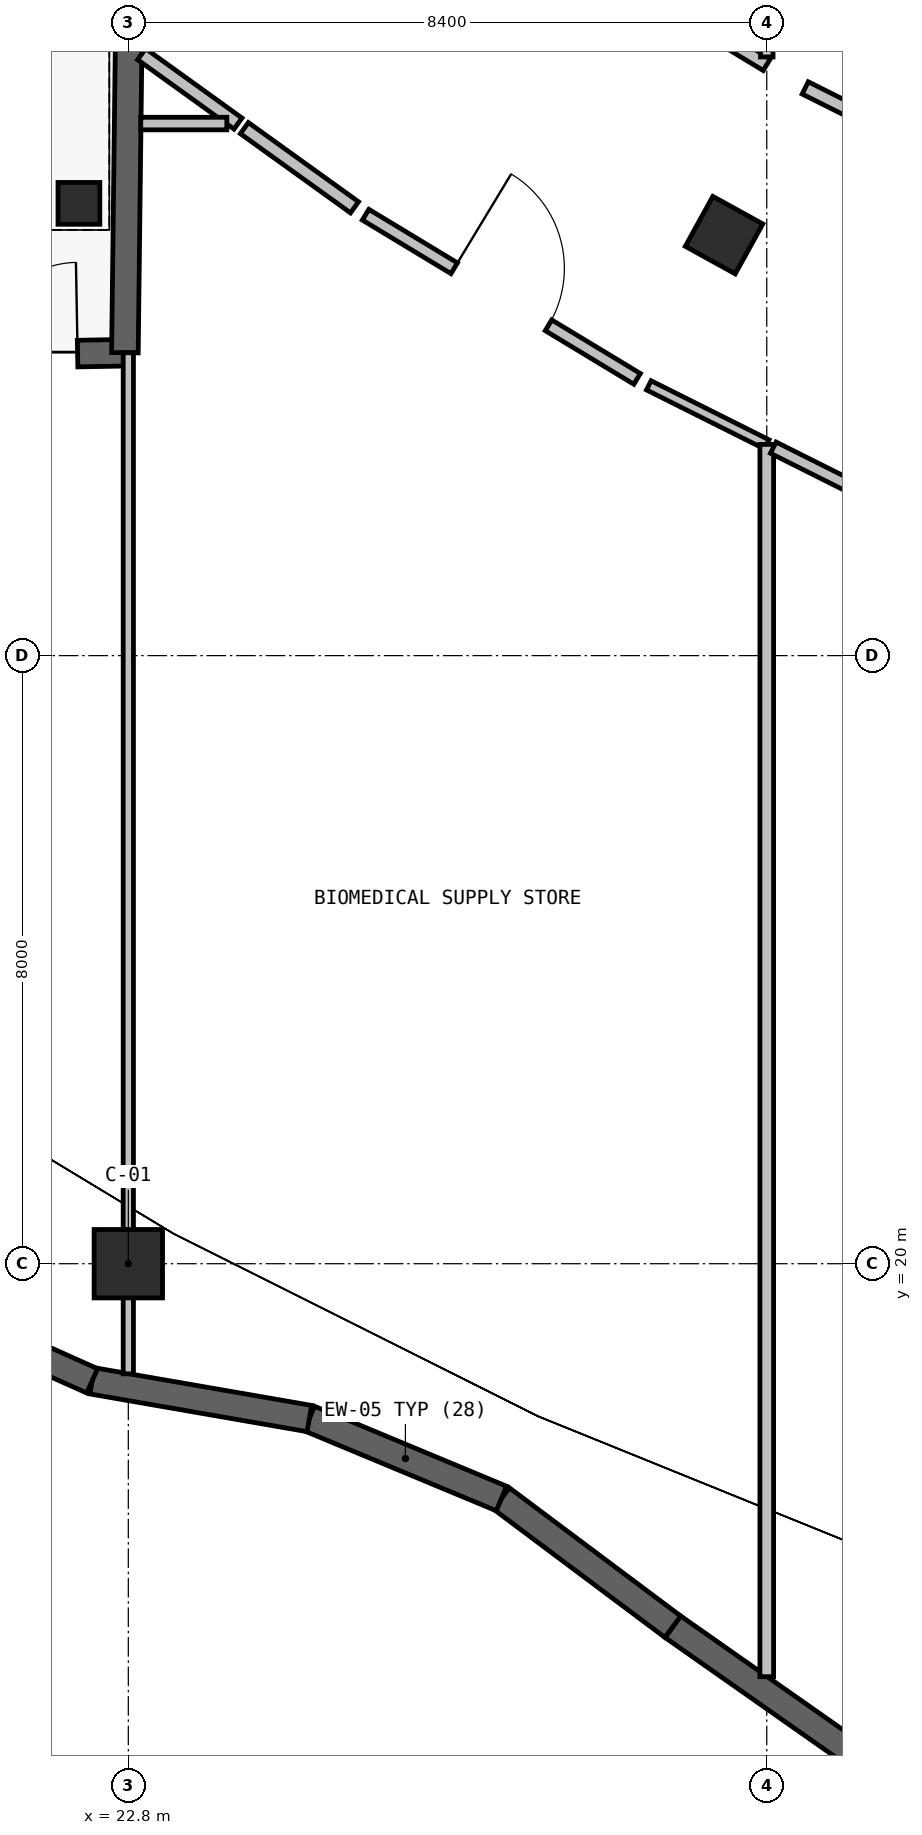
"""IFC4 building model, lengths in metres.
Left out: names, types, materials, properties, quantities, classifications, styles, units other than length and angle.
Written with IfcOpenShell. Run it as: python <this file> out.ifc"""

import sys

from ifc_helpers import new_model, si_unit, direction, frame, frame_2d, origin, origin_2d, place, context, subcontext, project, spatial, rectangle, extrude, element, fill, save


model = new_model("IFC4")
c1 = context("Model", 3, precision=1e-05, world=origin(), true_north=direction((0.0, 1.0)))
c2 = subcontext(c1, "Body", "Model", "MODEL_VIEW")
j1 = project(units=[si_unit("LENGTHUNIT", "METRE"), si_unit("PLANEANGLEUNIT", "RADIAN")], contexts=[c1])
p1 = place(None, origin())
s1 = spatial("IfcSite", under=j1, at=p1, CompositionType="ELEMENT")
p2 = place(p1, origin())
s2 = spatial("IfcBuilding", under=s1, at=p2, CompositionType="ELEMENT")
p3 = place(p2, frame((0.0, 0.0, -4.8)))
s3 = spatial("IfcBuildingStorey", under=s2, at=p3, CompositionType="ELEMENT", Elevation=-4.8)
p4 = place(p3, frame((22.15, 33.95, -0.245), z_axis=(0.0, 0.0, 1.0), x_axis=(1.0, 0.0, 0.0)))
e1 = element("IfcColumn", 1, at=p4, inside=s3, PredefinedType="COLUMN", context=c2, shape_type="SweptSolid", body=[
    extrude(rectangle(XDim=0.55, YDim=0.55, at=origin_2d()), origin(), (0.0, 0.0, 1.0), 3.625),
])
p5 = place(p3, frame((22.8, 20.0, 0.0), z_axis=(0.0, 0.0, 1.0), x_axis=(1.0, 0.0, 0.0)))
e2 = element("IfcColumn", 2, at=p5, inside=s3, PredefinedType="COLUMN", context=c2, shape_type="SweptSolid", body=[
    extrude(rectangle(XDim=0.9, YDim=0.9, at=origin_2d()), origin(), (0.0, 0.0, 1.0), 4.565),
])
p6 = place(p3, frame((30.638, 33.532, 0.0), z_axis=(0.0, 0.0, 1.0), x_axis=(0.483007324118, 0.875616311434, 0.0)))
e3 = element("IfcColumn", 3, at=p6, inside=s3, PredefinedType="COLUMN", context=c2, shape_type="SweptSolid", body=[
    extrude(rectangle(XDim=0.75, YDim=0.75, at=origin_2d()), origin(), (0.0, 0.0, 1.0), 4.8),
])
p7 = place(p3, frame((32.305, 13.582, 0.0), z_axis=(0.0, 0.0, 1.0), x_axis=(-0.818653879161, 0.574287233129, 0.0)))
e4 = element("IfcWall", 4, at=p7, inside=s3, PredefinedType="SHEAR", context=c2, shape_type="SweptSolid", body=[
    extrude(rectangle(XDim=2.859, YDim=0.35, at=frame_2d((1.43, 0.0))), origin(), (0.0, 0.0, 1.0), 4.45),
])
p8 = place(p3, frame((29.964, 15.224, 0.0), z_axis=(0.0, 0.0, 1.0), x_axis=(-0.800779557006, 0.598959181482, 0.0)))
e5 = element("IfcWall", 5, at=p8, inside=s3, PredefinedType="SHEAR", context=c2, shape_type="SweptSolid", body=[
    extrude(rectangle(XDim=2.816, YDim=0.35, at=frame_2d((1.408, 0.0))), origin(), (0.0, 0.0, 1.0), 4.45),
])
p9 = place(p3, frame((27.709, 16.911, 0.0), z_axis=(0.0, 0.0, 1.0), x_axis=(-0.923200896041, 0.384317714331, 0.0)))
e6 = element("IfcWall", 6, at=p9, inside=s3, PredefinedType="SHEAR", context=c2, shape_type="SweptSolid", body=[
    extrude(rectangle(XDim=2.737, YDim=0.35, at=frame_2d((1.369, 0.0))), origin(), (0.0, 0.0, 1.0), 4.45),
])
p10 = place(p3, frame((25.182, 17.963, 0.0), z_axis=(0.0, 0.0, 1.0), x_axis=(-0.985266066701, 0.171028587693, 0.0)))
e7 = element("IfcWall", 7, at=p10, inside=s3, PredefinedType="SHEAR", context=c2, shape_type="SweptSolid", body=[
    extrude(rectangle(XDim=2.901, YDim=0.35, at=frame_2d((1.45, 0.0))), origin(), (0.0, 0.0, 1.0), 4.45),
])
p11 = place(p3, frame((22.324, 18.459, 0.0), z_axis=(0.0, 0.0, 1.0), x_axis=(-0.912719610164, 0.408586481937, 0.0)))
e8 = element("IfcWall", 8, at=p11, inside=s3, PredefinedType="SHEAR", context=c2, shape_type="SweptSolid", body=[
    extrude(rectangle(XDim=2.793, YDim=0.35, at=frame_2d((1.396, 0.0))), origin(), (0.0, 0.0, 1.0), 4.45),
])
p12 = place(p3, frame((19.11, 31.919, 0.0), z_axis=(0.0, 0.0, 1.0), x_axis=(0.999835282464, 0.018149598871, 0.0)))
e9 = element("IfcWall", 9, at=p12, inside=s3, PredefinedType="SHEAR", context=c2, shape_type="SweptSolid", body=[
    extrude(rectangle(XDim=3.645, YDim=0.35, at=frame_2d((1.823, 0.0))), origin(), (0.0, 0.0, 1.0), 4.45),
])
p13 = place(p12, frame((0.623, 0.0, 0.0)))
e10 = element("IfcOpeningElement", 10, at=p13, cuts=e9, PredefinedType="OPENING", context=c2, shape_type="SweptSolid", body=[
    extrude(rectangle(XDim=2.4, YDim=2.35, at=frame_2d((1.2, 1.175))), frame((0.0, 0.185, 0.0), z_axis=(0.0, -1.0, 0.0), x_axis=(1.0, 0.0, 0.0)), (0.0, 0.0, 1.0), 0.37),
])
p14 = place(p3, frame((22.755, 31.985, 0.0), z_axis=(0.0, 0.0, 1.0), x_axis=(0.012149651428, 0.999926190261, 0.0)))
e11 = element("IfcWall", 11, at=p14, inside=s3, PredefinedType="SHEAR", context=c2, shape_type="SweptSolid", body=[
    extrude(rectangle(XDim=4.943, YDim=0.35, at=frame_2d((2.472, 0.0))), origin(), (0.0, 0.0, 1.0), 4.45),
])
p15 = place(p3, frame((31.2, 35.775, 0.0), z_axis=(0.0, 0.0, 1.0), x_axis=(-0.855653754928, 0.517548694982, 0.0)))
e12 = element("IfcWall", 12, at=p15, inside=s3, PredefinedType="PARTITIONING", context=c2, shape_type="SweptSolid", body=[
    extrude(rectangle(XDim=3.407, YDim=0.18, at=frame_2d((1.703, 0.0))), origin(), (0.0, 0.0, 1.0), 4.45),
])
p16 = place(p3, frame((22.975, 35.913, 0.0), z_axis=(0.0, 0.0, 1.0), x_axis=(0.811457274754, -0.584411748042, 0.0)))
e13 = element("IfcWall", 13, at=p16, inside=s3, PredefinedType="PARTITIONING", context=c2, shape_type="SweptSolid", body=[
    extrude(rectangle(XDim=1.562, YDim=0.18, at=frame_2d((0.781, 0.0))), origin(), (0.0, 0.0, 1.0), 4.45),
])
p17 = place(p3, frame((24.096, 35.0, 0.0), z_axis=(0.0, 0.0, 1.0), x_axis=(-1.0, 0.0, 0.0)))
e14 = element("IfcWall", 14, at=p17, inside=s3, PredefinedType="PARTITIONING", context=c2, shape_type="SweptSolid", body=[
    extrude(rectangle(XDim=1.132, YDim=0.165, at=frame_2d((0.566, 0.0))), origin(), (0.0, 0.0, 1.0), 4.45),
])
p18 = place(p3, frame((31.2, 43.854, 0.0), z_axis=(0.0, 0.0, 1.0), x_axis=(0.0, -1.0, 0.0)))
e15 = element("IfcWall", 15, at=p18, inside=s3, PredefinedType="PARTITIONING", context=c2, shape_type="SweptSolid", body=[
    extrude(rectangle(XDim=7.978, YDim=0.165, at=frame_2d((3.989, 0.0))), origin(), (0.0, 0.0, 1.0), 4.45),
])
p19 = place(p3, frame((22.8, 18.551, 0.0), z_axis=(0.0, 0.0, 1.0), x_axis=(0.0, 1.0, 0.0)))
e16 = element("IfcWall", 16, at=p19, inside=s3, PredefinedType="PARTITIONING", context=c2, shape_type="SweptSolid", body=[
    extrude(rectangle(XDim=13.433, YDim=0.135, at=frame_2d((6.716, 0.0))), origin(), (0.0, 0.0, 1.0), 4.45),
])
p20 = place(p3, frame((24.327, 34.94, 0.0), z_axis=(0.0, 0.0, 1.0), x_axis=(0.811871506141, -0.583836156396, 0.0)))
e17 = element("IfcWall", 17, at=p20, inside=s3, PredefinedType="PARTITIONING", context=c2, shape_type="SweptSolid", body=[
    extrude(rectangle(XDim=1.785, YDim=0.18, at=frame_2d((0.892, 0.0))), origin(), (0.0, 0.0, 1.0), 4.45),
])
p21 = place(p3, frame((25.922, 33.801, 0.0), z_axis=(0.0, 0.0, 1.0), x_axis=(0.855707289443, -0.517460177013, 0.0)))
e18 = element("IfcWall", 18, at=p21, inside=s3, PredefinedType="PARTITIONING", context=c2, shape_type="SweptSolid", body=[
    extrude(rectangle(XDim=4.174, YDim=0.165, at=frame_2d((2.087, 0.0))), origin(), (0.0, 0.0, 1.0), 4.45),
])
p22 = place(p21, frame((1.362, 0.0, 0.0)))
e19 = element("IfcOpeningElement", 19, at=p22, cuts=e18, PredefinedType="OPENING", context=c2, shape_type="SweptSolid", body=[
    extrude(rectangle(XDim=1.45, YDim=2.15, at=frame_2d((0.725, 1.075))), frame((0.0, 0.093, 0.0), z_axis=(0.0, -1.0, 0.0), x_axis=(1.0, 0.0, 0.0)), (0.0, 0.0, 1.0), 0.185),
])
p23 = place(p3, frame((29.648, 31.556, 0.0), z_axis=(0.0, 0.0, 1.0), x_axis=(0.894230168264, -0.447607424165, 0.0)))
e20 = element("IfcWall", 20, at=p23, inside=s3, PredefinedType="PARTITIONING", context=c2, shape_type="SweptSolid", body=[
    extrude(rectangle(XDim=1.736, YDim=0.135, at=frame_2d((0.868, 0.0))), origin(), (0.0, 0.0, 1.0), 4.45),
])
p24 = place(p3, frame((31.2, 30.779, 0.0), z_axis=(0.0, 0.0, 1.0), x_axis=(0.0, -1.0, 0.0)))
e21 = element("IfcWall", 21, at=p24, inside=s3, PredefinedType="PARTITIONING", context=c2, shape_type="SweptSolid", body=[
    extrude(rectangle(XDim=16.212, YDim=0.18, at=frame_2d((8.106, 0.0))), origin(), (0.0, 0.0, 1.0), 4.45),
])
p25 = place(p3, frame((31.286, 30.736, 0.0), z_axis=(0.0, 0.0, 1.0), x_axis=(0.894072491739, -0.447922291827, 0.0)))
e22 = element("IfcWall", 22, at=p25, inside=s3, PredefinedType="PARTITIONING", context=c2, shape_type="SweptSolid", body=[
    extrude(rectangle(XDim=2.342, YDim=0.165, at=frame_2d((1.171, 0.0))), origin(), (0.0, 0.0, 1.0), 4.45),
])
p26 = place(p3, frame((35.281, 33.678, 0.0), z_axis=(0.0, 0.0, 1.0), x_axis=(-0.894072773978, 0.447921728464, 0.0)))
e23 = element("IfcWall", 23, at=p26, inside=s3, PredefinedType="PARTITIONING", context=c2, shape_type="SweptSolid", body=[
    extrude(rectangle(XDim=3.999, YDim=0.18, at=frame_2d((1.999, 0.0))), origin(), (0.0, 0.0, 1.0), 4.45),
])
p27 = place(p13, origin())
e24 = element("IfcDoor", 24, at=p27, inside=s3, OperationType="DOUBLE_DOOR_SINGLE_SWING", PredefinedType="DOOR", context=c2, shape_type="SweptSolid", body=[
    extrude(rectangle(XDim=2.4, YDim=2.35, at=frame_2d((1.2, 1.175))), frame((0.0, 0.025, 0.0), z_axis=(0.0, -1.0, 0.0), x_axis=(1.0, 0.0, 0.0)), (0.0, 0.0, 1.0), 0.05),
])
fill(e10, e24)
p28 = place(p22, origin())
e25 = element("IfcDoor", 25, at=p28, inside=s3, OperationType="SINGLE_SWING_LEFT", PredefinedType="DOOR", context=c2, shape_type="SweptSolid", body=[
    extrude(rectangle(XDim=1.45, YDim=2.15, at=frame_2d((0.725, 1.075))), frame((0.0, 0.025, 0.0), z_axis=(0.0, -1.0, 0.0), x_axis=(1.0, 0.0, 0.0)), (0.0, 0.0, 1.0), 0.05),
])
fill(e19, e25)
save(model, sys.argv[1])
